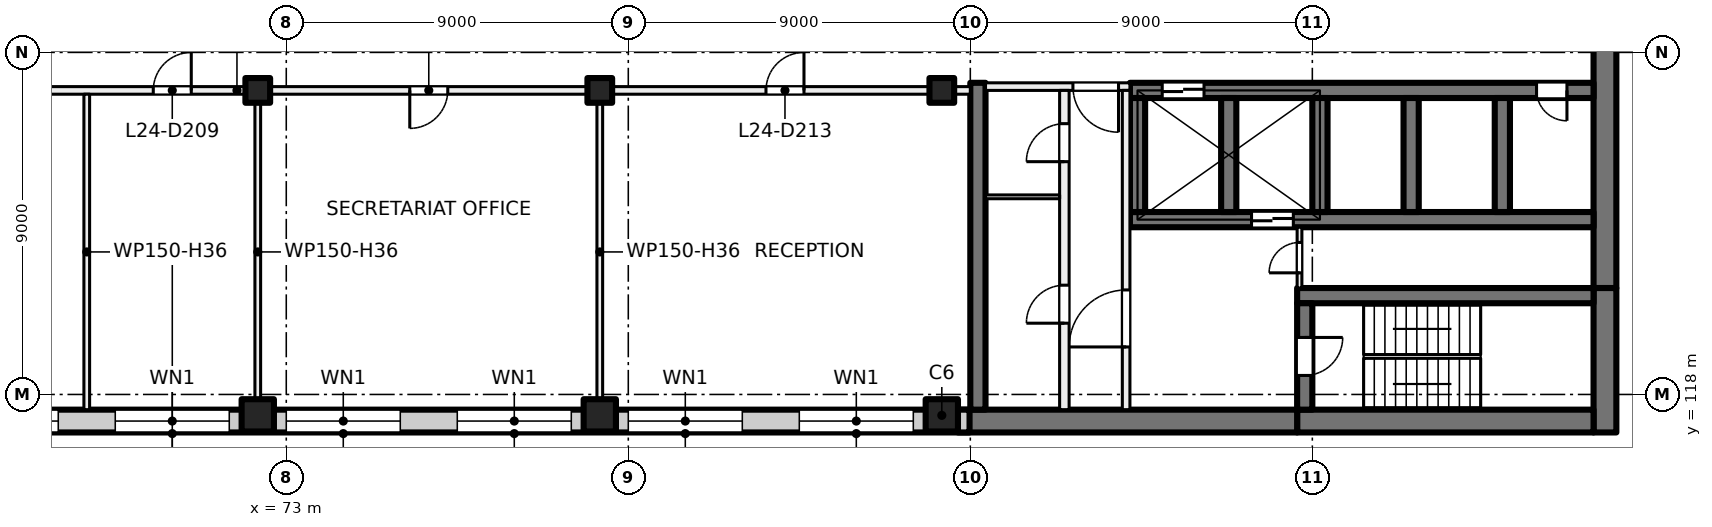
"""IFC4 building model, lengths in metres.
Left out: names, types, materials, properties, quantities, classifications, styles, units other than length and angle.
Written with IfcOpenShell. Run it as: python <this file> out.ifc"""

import sys

from ifc_helpers import new_model, si_unit, direction, frame, frame_2d, origin, origin_2d, place, context, subcontext, project, spatial, rectangle, extrude, element, fill, save


model = new_model("IFC4")
c1 = context("Model", 3, precision=1e-05, world=origin(), true_north=direction((0.0, 1.0)))
c2 = subcontext(c1, "Body", "Model", "MODEL_VIEW")
j1 = project(units=[si_unit("LENGTHUNIT", "METRE"), si_unit("PLANEANGLEUNIT", "RADIAN")], contexts=[c1])
p1 = place(None, origin())
s1 = spatial("IfcSite", under=j1, at=p1, CompositionType="ELEMENT")
p2 = place(p1, origin())
s2 = spatial("IfcBuilding", under=s1, at=p2, CompositionType="ELEMENT")
p3 = place(p2, frame((0.0, 0.0, 105.0)))
s3 = spatial("IfcBuildingStorey", under=s2, at=p3, CompositionType="ELEMENT", Elevation=105.0)
for number, where, z_axis, x_axis in (
    (1, (72.25, 126.0, 0.0), (0.0, 0.0, 1.0), (1.0, 0.0, 0.0)),
    (2, (81.25, 126.0, 0.0), (0.0, 0.0, 1.0), (1.0, 0.0, 0.0)),
    (3, (90.25, 126.0, 0.0), (0.0, 0.0, 1.0), (1.0, 0.0, 0.0)),
):
    element("IfcColumn", number, at=place(p3, frame(where, z_axis=z_axis, x_axis=x_axis)), inside=s3, PredefinedType="COLUMN", context=c2, shape_type="SweptSolid", body=[
        extrude(rectangle(XDim=0.65, YDim=0.65, at=origin_2d()), origin(), (0.0, 0.0, 1.0), 4.0),
    ])
for number, where, z_axis, x_axis in (
    (4, (72.25, 117.45, 0.0), (0.0, 0.0, 1.0), (1.0, 0.0, 0.0)),
    (5, (81.25, 117.45, 0.0), (0.0, 0.0, 1.0), (1.0, 0.0, 0.0)),
    (6, (90.25, 117.45, 0.0), (0.0, 0.0, 1.0), (1.0, 0.0, 0.0)),
):
    element("IfcColumn", number, at=place(p3, frame(where, z_axis=z_axis, x_axis=x_axis)), inside=s3, PredefinedType="COLUMN", context=c2, shape_type="SweptSolid", body=[
        extrude(rectangle(XDim=0.85, YDim=0.85, at=origin_2d()), origin(), (0.0, 0.0, 1.0), 4.0),
    ])
p4 = place(p3, frame((107.7, 135.2, 0.0), z_axis=(0.0, 0.0, 1.0), x_axis=(0.0, -1.0, 0.0)))
e7 = element("IfcWall", 7, at=p4, inside=s3, PredefinedType="SHEAR", context=c2, shape_type="SweptSolid", body=[
    extrude(rectangle(XDim=14.4, YDim=0.6, at=frame_2d((7.2, 0.0))), origin(), (0.0, 0.0, 1.0), 4.0),
])
p5 = place(p3, frame((107.7, 120.8, 0.0), z_axis=(0.0, 0.0, 1.0), x_axis=(0.0, -1.0, 0.0)))
e8 = element("IfcWall", 8, at=p5, inside=s3, PredefinedType="SHEAR", context=c2, shape_type="SweptSolid", body=[
    extrude(rectangle(XDim=3.8, YDim=0.6, at=frame_2d((1.9, 0.0))), origin(), (0.0, 0.0, 1.0), 4.0),
])
p6 = place(p3, frame((107.4, 117.3, 0.0), z_axis=(0.0, 0.0, 1.0), x_axis=(-1.0, 0.0, 0.0)))
e9 = element("IfcWall", 9, at=p6, inside=s3, PredefinedType="SHEAR", context=c2, shape_type="SweptSolid", body=[
    extrude(rectangle(XDim=7.8, YDim=0.6, at=frame_2d((3.9, 0.0))), origin(), (0.0, 0.0, 1.0), 4.0),
])
p7 = place(p3, frame((99.6, 117.3, 0.0), z_axis=(0.0, 0.0, 1.0), x_axis=(-1.0, 0.0, 0.0)))
e10 = element("IfcWall", 10, at=p7, inside=s3, PredefinedType="SHEAR", context=c2, shape_type="SweptSolid", body=[
    extrude(rectangle(XDim=8.925, YDim=0.6, at=frame_2d((4.462, 0.0))), origin(), (0.0, 0.0, 1.0), 4.0),
])
p8 = place(p3, frame((107.4, 120.6, 0.0), z_axis=(0.0, 0.0, 1.0), x_axis=(-1.0, 0.0, 0.0)))
e11 = element("IfcWall", 11, at=p8, inside=s3, PredefinedType="SHEAR", context=c2, shape_type="SweptSolid", body=[
    extrude(rectangle(XDim=7.8, YDim=0.4, at=frame_2d((3.9, 0.0))), origin(), (0.0, 0.0, 1.0), 4.0),
])
p9 = place(p3, frame((99.8, 120.4, 0.0), z_axis=(0.0, 0.0, 1.0), x_axis=(0.0, -1.0, 0.0)))
e12 = element("IfcWall", 12, at=p9, inside=s3, PredefinedType="SHEAR", context=c2, shape_type="SweptSolid", body=[
    extrude(rectangle(XDim=2.8, YDim=0.4, at=frame_2d((1.4, 0.0))), origin(), (0.0, 0.0, 1.0), 4.0),
])
p10 = place(p9, frame((0.9, 0.0, 0.0)))
e13 = element("IfcOpeningElement", 13, at=p10, cuts=e12, PredefinedType="OPENING", context=c2, shape_type="SweptSolid", body=[
    extrude(rectangle(XDim=1.0, YDim=2.1, at=frame_2d((0.5, 1.05))), frame((0.0, 0.21, 0.0), z_axis=(0.0, -1.0, 0.0), x_axis=(1.0, 0.0, 0.0)), (0.0, 0.0, 1.0), 0.42),
])
p11 = place(p3, frame((107.4, 126.0, 0.0), z_axis=(0.0, 0.0, 1.0), x_axis=(-1.0, 0.0, 0.0)))
e14 = element("IfcWall", 14, at=p11, inside=s3, PredefinedType="SHEAR", context=c2, shape_type="SweptSolid", body=[
    extrude(rectangle(XDim=12.2, YDim=0.4, at=frame_2d((6.1, 0.0))), origin(), (0.0, 0.0, 1.0), 4.0),
])
p12 = place(p11, frame((10.25, 0.0, 0.0)))
e15 = element("IfcOpeningElement", 15, at=p12, cuts=e14, PredefinedType="OPENING", context=c2, shape_type="SweptSolid", body=[
    extrude(rectangle(XDim=1.1, YDim=2.1, at=frame_2d((0.55, 1.05))), frame((0.0, 0.21, 0.0), z_axis=(0.0, -1.0, 0.0), x_axis=(1.0, 0.0, 0.0)), (0.0, 0.0, 1.0), 0.42),
])
p13 = place(p11, frame((0.7, 0.0, 0.0)))
e16 = element("IfcOpeningElement", 16, at=p13, cuts=e14, PredefinedType="OPENING", context=c2, shape_type="SweptSolid", body=[
    extrude(rectangle(XDim=0.8, YDim=2.1, at=frame_2d((0.4, 1.05))), frame((0.0, 0.21, 0.0), z_axis=(0.0, -1.0, 0.0), x_axis=(1.0, 0.0, 0.0)), (0.0, 0.0, 1.0), 0.42),
])
p14 = place(p3, frame((107.4, 122.6, 0.0), z_axis=(0.0, 0.0, 1.0), x_axis=(-1.0, 0.0, 0.0)))
e17 = element("IfcWall", 17, at=p14, inside=s3, PredefinedType="SHEAR", context=c2, shape_type="SweptSolid", body=[
    extrude(rectangle(XDim=12.2, YDim=0.4, at=frame_2d((6.1, 0.0))), origin(), (0.0, 0.0, 1.0), 4.0),
])
p15 = place(p14, frame((7.9, 0.0, 0.0)))
e18 = element("IfcOpeningElement", 18, at=p15, cuts=e17, PredefinedType="OPENING", context=c2, shape_type="SweptSolid", body=[
    extrude(rectangle(XDim=1.1, YDim=2.1, at=frame_2d((0.55, 1.05))), frame((0.0, 0.21, 0.0), z_axis=(0.0, -1.0, 0.0), x_axis=(1.0, 0.0, 0.0)), (0.0, 0.0, 1.0), 0.42),
])
for number, where, z_axis, x_axis in (
    (19, (105.0, 125.8, 0.0), (0.0, 0.0, 1.0), (0.0, -1.0, 0.0)),
    (20, (102.6, 125.8, 0.0), (0.0, 0.0, 1.0), (0.0, -1.0, 0.0)),
    (21, (100.2, 125.8, 0.0), (0.0, 0.0, 1.0), (0.0, -1.0, 0.0)),
    (22, (97.8, 125.8, 0.0), (0.0, 0.0, 1.0), (0.0, -1.0, 0.0)),
    (23, (95.4, 125.8, 0.0), (0.0, 0.0, 1.0), (0.0, -1.0, 0.0)),
):
    element("IfcWall", number, at=place(p3, frame(where, z_axis=z_axis, x_axis=x_axis)), inside=s3, PredefinedType="SHEAR", context=c2, shape_type="SweptSolid", body=[
        extrude(rectangle(XDim=3.0, YDim=0.4, at=frame_2d((1.5, 0.0))), origin(), (0.0, 0.0, 1.0), 4.0),
    ])
p16 = place(p3, frame((91.2, 126.2, 0.0), z_axis=(0.0, 0.0, 1.0), x_axis=(0.0, -1.0, 0.0)))
e24 = element("IfcWall", 24, at=p16, inside=s3, PredefinedType="SHEAR", context=c2, shape_type="SweptSolid", body=[
    extrude(rectangle(XDim=8.6, YDim=0.4, at=frame_2d((4.3, 0.0))), origin(), (0.0, 0.0, 1.0), 4.0),
])
p17 = place(p3, frame((90.98, 117.3, 0.0), z_axis=(0.0, 0.0, 1.0), x_axis=(-1.0, 0.0, 0.0)))
e25 = element("IfcWall", 25, at=p17, inside=s3, PredefinedType="SOLIDWALL", context=c2, shape_type="SweptSolid", body=[
    extrude(rectangle(XDim=32.845, YDim=0.6, at=frame_2d((16.422, 0.0))), origin(), (0.0, 0.0, 1.0), 3.625),
])
p18 = place(p17, frame((1.48, 0.0, 0.9)))
e26 = element("IfcOpeningElement", 26, at=p18, cuts=e25, PredefinedType="OPENING", context=c2, shape_type="SweptSolid", body=[
    extrude(rectangle(XDim=3.0, YDim=2.4, at=frame_2d((1.5, 1.2))), frame((0.0, 0.31, 0.0), z_axis=(0.0, -1.0, 0.0), x_axis=(1.0, 0.0, 0.0)), (0.0, 0.0, 1.0), 0.62),
])
p19 = place(p17, frame((5.98, 0.0, 0.9)))
e27 = element("IfcOpeningElement", 27, at=p19, cuts=e25, PredefinedType="OPENING", context=c2, shape_type="SweptSolid", body=[
    extrude(rectangle(XDim=3.0, YDim=2.4, at=frame_2d((1.5, 1.2))), frame((0.0, 0.31, 0.0), z_axis=(0.0, -1.0, 0.0), x_axis=(1.0, 0.0, 0.0)), (0.0, 0.0, 1.0), 0.62),
])
p20 = place(p17, frame((10.48, 0.0, 0.9)))
e28 = element("IfcOpeningElement", 28, at=p20, cuts=e25, PredefinedType="OPENING", context=c2, shape_type="SweptSolid", body=[
    extrude(rectangle(XDim=3.0, YDim=2.4, at=frame_2d((1.5, 1.2))), frame((0.0, 0.31, 0.0), z_axis=(0.0, -1.0, 0.0), x_axis=(1.0, 0.0, 0.0)), (0.0, 0.0, 1.0), 0.62),
])
p21 = place(p17, frame((14.98, 0.0, 0.9)))
e29 = element("IfcOpeningElement", 29, at=p21, cuts=e25, PredefinedType="OPENING", context=c2, shape_type="SweptSolid", body=[
    extrude(rectangle(XDim=3.0, YDim=2.4, at=frame_2d((1.5, 1.2))), frame((0.0, 0.31, 0.0), z_axis=(0.0, -1.0, 0.0), x_axis=(1.0, 0.0, 0.0)), (0.0, 0.0, 1.0), 0.62),
])
p22 = place(p17, frame((19.48, 0.0, 0.9)))
e30 = element("IfcOpeningElement", 30, at=p22, cuts=e25, PredefinedType="OPENING", context=c2, shape_type="SweptSolid", body=[
    extrude(rectangle(XDim=3.0, YDim=2.4, at=frame_2d((1.5, 1.2))), frame((0.0, 0.31, 0.0), z_axis=(0.0, -1.0, 0.0), x_axis=(1.0, 0.0, 0.0)), (0.0, 0.0, 1.0), 0.62),
])
p23 = place(p17, frame((23.98, 0.0, 0.9)))
e31 = element("IfcOpeningElement", 31, at=p23, cuts=e25, PredefinedType="OPENING", context=c2, shape_type="SweptSolid", body=[
    extrude(rectangle(XDim=3.0, YDim=2.4, at=frame_2d((1.5, 1.2))), frame((0.0, 0.31, 0.0), z_axis=(0.0, -1.0, 0.0), x_axis=(1.0, 0.0, 0.0)), (0.0, 0.0, 1.0), 0.62),
])
p24 = place(p17, frame((28.48, 0.0, 0.9)))
e32 = element("IfcOpeningElement", 32, at=p24, cuts=e25, PredefinedType="OPENING", context=c2, shape_type="SweptSolid", body=[
    extrude(rectangle(XDim=3.0, YDim=2.4, at=frame_2d((1.5, 1.2))), frame((0.0, 0.31, 0.0), z_axis=(0.0, -1.0, 0.0), x_axis=(1.0, 0.0, 0.0)), (0.0, 0.0, 1.0), 0.62),
])
p25 = place(p3, frame((95.2, 126.1, 0.0), z_axis=(0.0, 0.0, 1.0), x_axis=(-1.0, 0.0, 0.0)))
e33 = element("IfcWall", 33, at=p25, inside=s3, PredefinedType="PARTITIONING", context=c2, shape_type="SweptSolid", body=[
    extrude(rectangle(XDim=3.8, YDim=0.2, at=frame_2d((1.9, 0.0))), origin(), (0.0, 0.0, 1.0), 3.625),
])
p26 = place(p25, frame((0.3, 0.0, 0.0)))
e34 = element("IfcOpeningElement", 34, at=p26, cuts=e33, PredefinedType="OPENING", context=c2, shape_type="SweptSolid", body=[
    extrude(rectangle(XDim=1.2, YDim=2.1, at=frame_2d((0.6, 1.05))), frame((0.0, 0.11, 0.0), z_axis=(0.0, -1.0, 0.0), x_axis=(1.0, 0.0, 0.0)), (0.0, 0.0, 1.0), 0.22),
])
p27 = place(p3, frame((95.1, 117.6, 0.0), z_axis=(0.0, 0.0, 1.0), x_axis=(0.0, 1.0, 0.0)))
e35 = element("IfcWall", 35, at=p27, inside=s3, PredefinedType="PARTITIONING", context=c2, shape_type="SweptSolid", body=[
    extrude(rectangle(XDim=8.4, YDim=0.2, at=frame_2d((4.2, 0.0))), origin(), (0.0, 0.0, 1.0), 3.625),
])
p28 = place(p27, frame((1.65, 0.0, 0.0)))
e36 = element("IfcOpeningElement", 36, at=p28, cuts=e35, PredefinedType="OPENING", context=c2, shape_type="SweptSolid", body=[
    extrude(rectangle(XDim=1.5, YDim=2.1, at=frame_2d((0.75, 1.05))), frame((0.0, 0.11, 0.0), z_axis=(0.0, -1.0, 0.0), x_axis=(1.0, 0.0, 0.0)), (0.0, 0.0, 1.0), 0.22),
])
p29 = place(p3, frame((93.475, 117.6, 0.0), z_axis=(0.0, 0.0, 1.0), x_axis=(0.0, 1.0, 0.0)))
e37 = element("IfcWall", 37, at=p29, inside=s3, PredefinedType="PARTITIONING", context=c2, shape_type="SweptSolid", body=[
    extrude(rectangle(XDim=8.4, YDim=0.25, at=frame_2d((4.2, 0.0))), origin(), (0.0, 0.0, 1.0), 3.625),
])
p30 = place(p29, frame((6.525, 0.0, 0.0)))
e38 = element("IfcOpeningElement", 38, at=p30, cuts=e37, PredefinedType="OPENING", context=c2, shape_type="SweptSolid", body=[
    extrude(rectangle(XDim=1.0, YDim=2.1, at=frame_2d((0.5, 1.05))), frame((0.0, 0.135, 0.0), z_axis=(0.0, -1.0, 0.0), x_axis=(1.0, 0.0, 0.0)), (0.0, 0.0, 1.0), 0.27),
])
p31 = place(p29, frame((2.275, 0.0, 0.0)))
e39 = element("IfcOpeningElement", 39, at=p31, cuts=e37, PredefinedType="OPENING", context=c2, shape_type="SweptSolid", body=[
    extrude(rectangle(XDim=1.0, YDim=2.1, at=frame_2d((0.5, 1.05))), frame((0.0, 0.135, 0.0), z_axis=(0.0, -1.0, 0.0), x_axis=(1.0, 0.0, 0.0)), (0.0, 0.0, 1.0), 0.27),
])
p32 = place(p3, frame((99.663, 120.8, 0.0), z_axis=(0.0, 0.0, 1.0), x_axis=(0.0, 1.0, 0.0)))
e40 = element("IfcWall", 40, at=p32, inside=s3, PredefinedType="PARTITIONING", context=c2, shape_type="SweptSolid", body=[
    extrude(rectangle(XDim=1.6, YDim=0.125, at=frame_2d((0.8, 0.0))), origin(), (0.0, 0.0, 1.0), 3.625),
])
p33 = place(p32, frame((0.4, 0.0, 0.0)))
e41 = element("IfcOpeningElement", 41, at=p33, cuts=e40, PredefinedType="OPENING", context=c2, shape_type="SweptSolid", body=[
    extrude(rectangle(XDim=0.8, YDim=2.1, at=frame_2d((0.4, 1.05))), frame((0.0, 0.073, 0.0), z_axis=(0.0, -1.0, 0.0), x_axis=(1.0, 0.0, 0.0)), (0.0, 0.0, 1.0), 0.145),
])
p34 = place(p3, frame((93.35, 123.2, 0.0), z_axis=(0.0, 0.0, 1.0), x_axis=(-1.0, 0.0, 0.0)))
e42 = element("IfcWall", 42, at=p34, inside=s3, PredefinedType="PARTITIONING", context=c2, shape_type="SweptSolid", body=[
    extrude(rectangle(XDim=1.95, YDim=0.1, at=frame_2d((0.975, 0.0))), origin(), (0.0, 0.0, 1.0), 3.625),
])
p35 = place(p3, frame((91.0, 126.0, 0.0), z_axis=(0.0, 0.0, 1.0), x_axis=(-1.0, 0.0, 0.0)))
e43 = element("IfcWall", 43, at=p35, inside=s3, PredefinedType="PARTITIONING", context=c2, shape_type="SweptSolid", body=[
    extrude(rectangle(XDim=38.595, YDim=0.2, at=frame_2d((19.297, 0.0))), origin(), (0.0, 0.0, 1.0), 3.625),
])
p36 = place(p35, frame((30.421, 0.0, 0.0)))
e44 = element("IfcOpeningElement", 44, at=p36, cuts=e43, PredefinedType="OPENING", context=c2, shape_type="SweptSolid", body=[
    extrude(rectangle(XDim=1.0, YDim=2.1, at=frame_2d((0.5, 1.05))), frame((0.0, 0.11, 0.0), z_axis=(0.0, -1.0, 0.0), x_axis=(1.0, 0.0, 0.0)), (0.0, 0.0, 1.0), 0.22),
])
p37 = place(p35, frame((20.5, 0.0, 0.0)))
e45 = element("IfcOpeningElement", 45, at=p37, cuts=e43, PredefinedType="OPENING", context=c2, shape_type="SweptSolid", body=[
    extrude(rectangle(XDim=1.0, YDim=2.1, at=frame_2d((0.5, 1.05))), frame((0.0, 0.11, 0.0), z_axis=(0.0, -1.0, 0.0), x_axis=(1.0, 0.0, 0.0)), (0.0, 0.0, 1.0), 0.22),
])
p38 = place(p35, frame((13.75, 0.0, 0.0)))
e46 = element("IfcOpeningElement", 46, at=p38, cuts=e43, PredefinedType="OPENING", context=c2, shape_type="SweptSolid", body=[
    extrude(rectangle(XDim=1.0, YDim=2.1, at=frame_2d((0.5, 1.05))), frame((0.0, 0.11, 0.0), z_axis=(0.0, -1.0, 0.0), x_axis=(1.0, 0.0, 0.0)), (0.0, 0.0, 1.0), 0.22),
])
p39 = place(p35, frame((4.377, 0.0, 0.0)))
e47 = element("IfcOpeningElement", 47, at=p39, cuts=e43, PredefinedType="OPENING", context=c2, shape_type="SweptSolid", body=[
    extrude(rectangle(XDim=1.0, YDim=2.1, at=frame_2d((0.5, 1.05))), frame((0.0, 0.11, 0.0), z_axis=(0.0, -1.0, 0.0), x_axis=(1.0, 0.0, 0.0)), (0.0, 0.0, 1.0), 0.22),
])
for number, where, z_axis, x_axis in (
    (48, (67.75, 117.6, 0.0), (0.0, 0.0, 1.0), (0.0, 1.0, 0.0)),
    (49, (72.25, 117.6, 0.0), (0.0, 0.0, 1.0), (0.0, 1.0, 0.0)),
    (50, (81.25, 117.6, 0.0), (0.0, 0.0, 1.0), (0.0, 1.0, 0.0)),
):
    element("IfcWall", number, at=place(p3, frame(where, z_axis=z_axis, x_axis=x_axis)), inside=s3, PredefinedType="PARTITIONING", context=c2, shape_type="SweptSolid", body=[
        extrude(rectangle(XDim=8.3, YDim=0.15, at=frame_2d((4.15, 0.0))), origin(), (0.0, 0.0, 1.0), 3.625),
    ])
p40 = place(p18, origin())
e51 = element("IfcWindow", 51, at=p40, inside=s3, PartitioningType="SINGLE_PANEL", PredefinedType="WINDOW", context=c2, shape_type="SweptSolid", body=[
    extrude(rectangle(XDim=3.0, YDim=2.4, at=frame_2d((1.5, 1.2))), frame((0.0, 0.03, 0.0), z_axis=(0.0, -1.0, 0.0), x_axis=(1.0, 0.0, 0.0)), (0.0, 0.0, 1.0), 0.06),
])
fill(e26, e51)
p41 = place(p19, origin())
e52 = element("IfcWindow", 52, at=p41, inside=s3, PartitioningType="SINGLE_PANEL", PredefinedType="WINDOW", context=c2, shape_type="SweptSolid", body=[
    extrude(rectangle(XDim=3.0, YDim=2.4, at=frame_2d((1.5, 1.2))), frame((0.0, 0.03, 0.0), z_axis=(0.0, -1.0, 0.0), x_axis=(1.0, 0.0, 0.0)), (0.0, 0.0, 1.0), 0.06),
])
fill(e27, e52)
p42 = place(p20, origin())
e53 = element("IfcWindow", 53, at=p42, inside=s3, PartitioningType="SINGLE_PANEL", PredefinedType="WINDOW", context=c2, shape_type="SweptSolid", body=[
    extrude(rectangle(XDim=3.0, YDim=2.4, at=frame_2d((1.5, 1.2))), frame((0.0, 0.03, 0.0), z_axis=(0.0, -1.0, 0.0), x_axis=(1.0, 0.0, 0.0)), (0.0, 0.0, 1.0), 0.06),
])
fill(e28, e53)
p43 = place(p21, origin())
e54 = element("IfcWindow", 54, at=p43, inside=s3, PartitioningType="SINGLE_PANEL", PredefinedType="WINDOW", context=c2, shape_type="SweptSolid", body=[
    extrude(rectangle(XDim=3.0, YDim=2.4, at=frame_2d((1.5, 1.2))), frame((0.0, 0.03, 0.0), z_axis=(0.0, -1.0, 0.0), x_axis=(1.0, 0.0, 0.0)), (0.0, 0.0, 1.0), 0.06),
])
fill(e29, e54)
p44 = place(p22, origin())
e55 = element("IfcWindow", 55, at=p44, inside=s3, PartitioningType="SINGLE_PANEL", PredefinedType="WINDOW", context=c2, shape_type="SweptSolid", body=[
    extrude(rectangle(XDim=3.0, YDim=2.4, at=frame_2d((1.5, 1.2))), frame((0.0, 0.03, 0.0), z_axis=(0.0, -1.0, 0.0), x_axis=(1.0, 0.0, 0.0)), (0.0, 0.0, 1.0), 0.06),
])
fill(e30, e55)
p45 = place(p23, origin())
e56 = element("IfcWindow", 56, at=p45, inside=s3, PartitioningType="SINGLE_PANEL", PredefinedType="WINDOW", context=c2, shape_type="SweptSolid", body=[
    extrude(rectangle(XDim=3.0, YDim=2.4, at=frame_2d((1.5, 1.2))), frame((0.0, 0.03, 0.0), z_axis=(0.0, -1.0, 0.0), x_axis=(1.0, 0.0, 0.0)), (0.0, 0.0, 1.0), 0.06),
])
fill(e31, e56)
p46 = place(p12, origin())
e57 = element("IfcDoor", 57, at=p46, inside=s3, OperationType="DOUBLE_DOOR_SLIDING", PredefinedType="DOOR", context=c2, shape_type="SweptSolid", body=[
    extrude(rectangle(XDim=1.1, YDim=2.1, at=frame_2d((0.55, 1.05))), frame((0.0, 0.025, 0.0), z_axis=(0.0, -1.0, 0.0), x_axis=(1.0, 0.0, 0.0)), (0.0, 0.0, 1.0), 0.05),
])
fill(e15, e57)
p47 = place(p13, origin())
e58 = element("IfcDoor", 58, at=p47, inside=s3, OperationType="SINGLE_SWING_LEFT", PredefinedType="DOOR", context=c2, shape_type="SweptSolid", body=[
    extrude(rectangle(XDim=0.8, YDim=2.1, at=frame_2d((0.4, 1.05))), frame((0.0, 0.025, 0.0), z_axis=(0.0, -1.0, 0.0), x_axis=(1.0, 0.0, 0.0)), (0.0, 0.0, 1.0), 0.05),
])
fill(e16, e58)
p48 = place(p26, origin())
e59 = element("IfcDoor", 59, at=p48, inside=s3, OperationType="DOUBLE_DOOR_SINGLE_SWING", PredefinedType="DOOR", context=c2, shape_type="SweptSolid", body=[
    extrude(rectangle(XDim=1.2, YDim=2.1, at=frame_2d((0.6, 1.05))), frame((0.0, 0.025, 0.0), z_axis=(0.0, -1.0, 0.0), x_axis=(1.0, 0.0, 0.0)), (0.0, 0.0, 1.0), 0.05),
])
fill(e34, e59)
p49 = place(p28, origin())
e60 = element("IfcDoor", 60, at=p49, inside=s3, OperationType="DOUBLE_DOOR_SINGLE_SWING", PredefinedType="DOOR", context=c2, shape_type="SweptSolid", body=[
    extrude(rectangle(XDim=1.5, YDim=2.1, at=frame_2d((0.75, 1.05))), frame((0.0, 0.025, 0.0), z_axis=(0.0, -1.0, 0.0), x_axis=(1.0, 0.0, 0.0)), (0.0, 0.0, 1.0), 0.05),
])
fill(e36, e60)
p50 = place(p10, origin())
e61 = element("IfcDoor", 61, at=p50, inside=s3, OperationType="SINGLE_SWING_LEFT", PredefinedType="DOOR", context=c2, shape_type="SweptSolid", body=[
    extrude(rectangle(XDim=1.0, YDim=2.1, at=frame_2d((0.5, 1.05))), frame((0.0, 0.025, 0.0), z_axis=(0.0, -1.0, 0.0), x_axis=(1.0, 0.0, 0.0)), (0.0, 0.0, 1.0), 0.05),
])
fill(e13, e61)
p51 = place(p33, origin())
e62 = element("IfcDoor", 62, at=p51, inside=s3, OperationType="SINGLE_SWING_RIGHT", PredefinedType="DOOR", context=c2, shape_type="SweptSolid", body=[
    extrude(rectangle(XDim=0.8, YDim=2.1, at=frame_2d((0.4, 1.05))), frame((0.0, 0.025, 0.0), z_axis=(0.0, -1.0, 0.0), x_axis=(1.0, 0.0, 0.0)), (0.0, 0.0, 1.0), 0.05),
])
fill(e41, e62)
p52 = place(p30, origin())
e63 = element("IfcDoor", 63, at=p52, inside=s3, OperationType="SINGLE_SWING_LEFT", PredefinedType="DOOR", context=c2, shape_type="SweptSolid", body=[
    extrude(rectangle(XDim=1.0, YDim=2.1, at=frame_2d((0.5, 1.05))), frame((0.0, 0.025, 0.0), z_axis=(0.0, -1.0, 0.0), x_axis=(1.0, 0.0, 0.0)), (0.0, 0.0, 1.0), 0.05),
])
fill(e38, e63)
p53 = place(p31, origin())
e64 = element("IfcDoor", 64, at=p53, inside=s3, OperationType="SINGLE_SWING_RIGHT", PredefinedType="DOOR", context=c2, shape_type="SweptSolid", body=[
    extrude(rectangle(XDim=1.0, YDim=2.1, at=frame_2d((0.5, 1.05))), frame((0.0, 0.025, 0.0), z_axis=(0.0, -1.0, 0.0), x_axis=(1.0, 0.0, 0.0)), (0.0, 0.0, 1.0), 0.05),
])
fill(e39, e64)
p54 = place(p15, origin())
e65 = element("IfcDoor", 65, at=p54, inside=s3, OperationType="DOUBLE_DOOR_SLIDING", PredefinedType="DOOR", context=c2, shape_type="SweptSolid", body=[
    extrude(rectangle(XDim=1.1, YDim=2.1, at=frame_2d((0.55, 1.05))), frame((0.0, 0.025, 0.0), z_axis=(0.0, -1.0, 0.0), x_axis=(1.0, 0.0, 0.0)), (0.0, 0.0, 1.0), 0.05),
])
fill(e18, e65)
p55 = place(p37, origin())
e66 = element("IfcDoor", 66, at=p55, inside=s3, OperationType="SINGLE_SWING_LEFT", PredefinedType="DOOR", context=c2, shape_type="SweptSolid", body=[
    extrude(rectangle(XDim=1.0, YDim=2.1, at=frame_2d((0.5, 1.05))), frame((0.0, 0.025, 0.0), z_axis=(0.0, -1.0, 0.0), x_axis=(1.0, 0.0, 0.0)), (0.0, 0.0, 1.0), 0.05),
])
fill(e45, e66)
p56 = place(p38, origin())
e67 = element("IfcDoor", 67, at=p56, inside=s3, OperationType="SINGLE_SWING_RIGHT", PredefinedType="DOOR", context=c2, shape_type="SweptSolid", body=[
    extrude(rectangle(XDim=1.0, YDim=2.1, at=frame_2d((0.5, 1.05))), frame((0.0, 0.025, 0.0), z_axis=(0.0, -1.0, 0.0), x_axis=(1.0, 0.0, 0.0)), (0.0, 0.0, 1.0), 0.05),
])
fill(e46, e67)
p57 = place(p39, origin())
e68 = element("IfcDoor", 68, at=p57, inside=s3, OperationType="SINGLE_SWING_LEFT", PredefinedType="DOOR", context=c2, shape_type="SweptSolid", body=[
    extrude(rectangle(XDim=1.0, YDim=2.1, at=frame_2d((0.5, 1.05))), frame((0.0, 0.025, 0.0), z_axis=(0.0, -1.0, 0.0), x_axis=(1.0, 0.0, 0.0)), (0.0, 0.0, 1.0), 0.05),
])
fill(e47, e68)
save(model, sys.argv[1])
